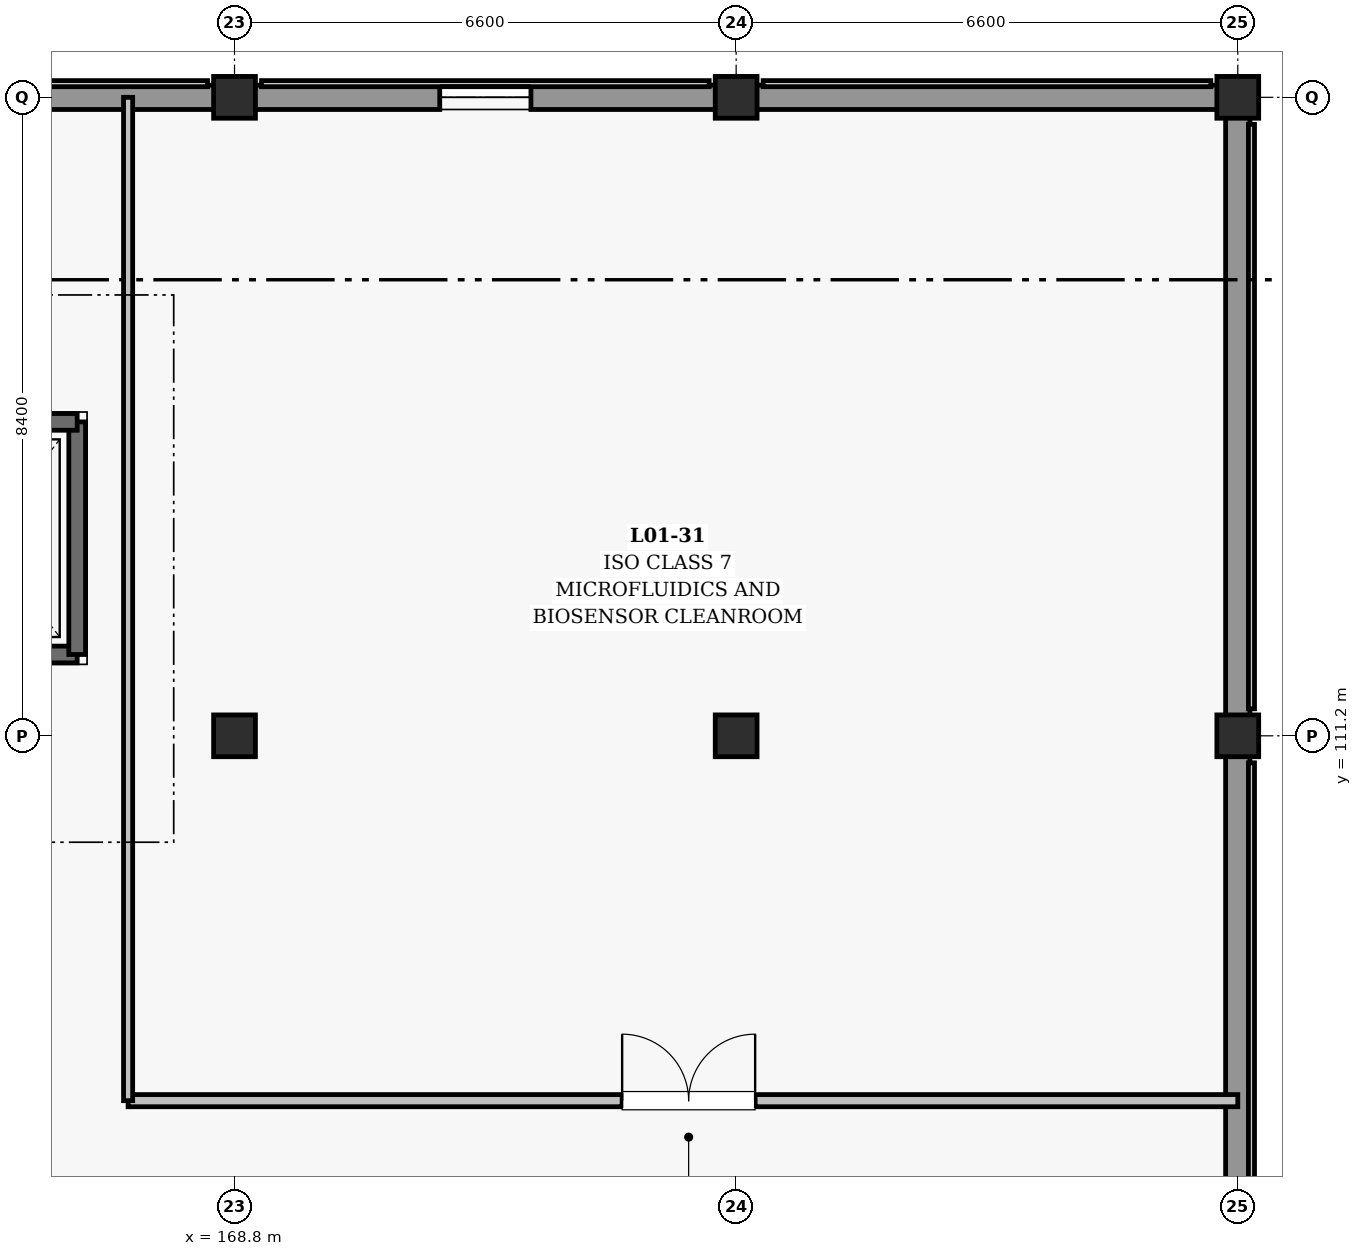
"""IFC4 building model, lengths in metres.
Left out: names, types, materials, properties, quantities, classifications, styles, units other than length and angle.
Written with IfcOpenShell. Run it as: python <this file> out.ifc"""

import sys

from ifc_helpers import new_model, si_unit, direction, frame, frame_2d, origin, origin_2d, place, context, subcontext, project, spatial, rectangle, extrude, element, fill, save


model = new_model("IFC4")
c1 = context("Model", 3, precision=1e-05, world=origin(), true_north=direction((0.0, 1.0)))
c2 = subcontext(c1, "Body", "Model", "MODEL_VIEW")
j1 = project(units=[si_unit("LENGTHUNIT", "METRE"), si_unit("PLANEANGLEUNIT", "RADIAN")], contexts=[c1])
p1 = place(None, origin())
s1 = spatial("IfcSite", under=j1, at=p1, CompositionType="ELEMENT")
p2 = place(p1, origin())
s2 = spatial("IfcBuilding", under=s1, at=p2, CompositionType="ELEMENT")
p3 = place(p2, frame((0.0, 0.0, 5.4)))
s3 = spatial("IfcBuildingStorey", under=s2, at=p3, CompositionType="ELEMENT", Elevation=5.4)
for number, where, z_axis, x_axis in (
    (1, (168.8, 111.2, 0.0), (0.0, 0.0, 1.0), (1.0, 0.0, 0.0)),
    (2, (168.8, 119.6, 0.0), (0.0, 0.0, 1.0), (1.0, 0.0, 0.0)),
    (3, (175.4, 111.2, 0.0), (0.0, 0.0, 1.0), (1.0, 0.0, 0.0)),
    (4, (175.4, 119.6, 0.0), (0.0, 0.0, 1.0), (1.0, 0.0, 0.0)),
    (5, (182.0, 111.2, 0.0), (0.0, 0.0, 1.0), (1.0, 0.0, 0.0)),
    (6, (182.0, 119.6, 0.0), (0.0, 0.0, 1.0), (1.0, 0.0, 0.0)),
):
    element("IfcColumn", number, at=place(p3, frame(where, z_axis=z_axis, x_axis=x_axis)), inside=s3, PredefinedType="COLUMN", context=c2, shape_type="SweptSolid", body=[
        extrude(rectangle(XDim=0.55, YDim=0.55, at=origin_2d()), origin(), (0.0, 0.0, 1.0), 4.5),
    ])
p4 = place(p3, frame((162.455, 119.6, 0.0), z_axis=(0.0, 0.0, 1.0), x_axis=(1.0, 0.0, 0.0)))
e7 = element("IfcWall", 7, at=p4, inside=s3, PredefinedType="SOLIDWALL", context=c2, shape_type="SweptSolid", body=[
    extrude(rectangle(XDim=6.09, YDim=0.32, at=frame_2d((3.045, 0.0))), origin(), (0.0, 0.0, 1.0), 3.305),
])
p5 = place(p3, frame((169.055, 119.6, 0.0), z_axis=(0.0, 0.0, 1.0), x_axis=(1.0, 0.0, 0.0)))
e8 = element("IfcWall", 8, at=p5, inside=s3, PredefinedType="SOLIDWALL", context=c2, shape_type="SweptSolid", body=[
    extrude(rectangle(XDim=6.09, YDim=0.32, at=frame_2d((3.045, 0.0))), origin(), (0.0, 0.0, 1.0), 3.355),
])
p6 = place(p5, frame((2.445, 0.0, 1.85)))
e9 = element("IfcOpeningElement", 9, at=p6, cuts=e8, PredefinedType="OPENING", context=c2, shape_type="SweptSolid", body=[
    extrude(rectangle(XDim=1.2, YDim=1.1, at=frame_2d((0.6, 0.55))), frame((0.0, 0.17, 0.0), z_axis=(0.0, -1.0, 0.0), x_axis=(1.0, 0.0, 0.0)), (0.0, 0.0, 1.0), 0.34),
])
p7 = place(p3, frame((175.655, 119.6, 0.0), z_axis=(0.0, 0.0, 1.0), x_axis=(1.0, 0.0, 0.0)))
e10 = element("IfcWall", 10, at=p7, inside=s3, PredefinedType="SOLIDWALL", context=c2, shape_type="SweptSolid", body=[
    extrude(rectangle(XDim=6.09, YDim=0.32, at=frame_2d((3.045, 0.0))), origin(), (0.0, 0.0, 1.0), 3.58),
])
p8 = place(p3, frame((182.0, 103.055, 0.0), z_axis=(0.0, 0.0, 1.0), x_axis=(0.0, 1.0, 0.0)))
e11 = element("IfcWall", 11, at=p8, inside=s3, PredefinedType="SOLIDWALL", context=c2, shape_type="SweptSolid", body=[
    extrude(rectangle(XDim=7.89, YDim=0.32, at=frame_2d((3.945, 0.0))), origin(), (0.0, 0.0, 1.0), 3.455),
])
p9 = place(p3, frame((182.0, 111.455, 0.0), z_axis=(0.0, 0.0, 1.0), x_axis=(0.0, 1.0, 0.0)))
e12 = element("IfcWall", 12, at=p9, inside=s3, PredefinedType="SOLIDWALL", context=c2, shape_type="SweptSolid", body=[
    extrude(rectangle(XDim=7.89, YDim=0.32, at=frame_2d((3.945, 0.0))), origin(), (0.0, 0.0, 1.0), 3.58),
])
p10 = place(p3, frame((164.27, 112.27, 0.0), z_axis=(0.0, 0.0, 1.0), x_axis=(1.0, 0.0, 0.0)))
e13 = element("IfcWall", 13, at=p10, inside=s3, PredefinedType="SHEAR", context=c2, shape_type="SweptSolid", body=[
    extrude(rectangle(XDim=2.46, YDim=0.22, at=frame_2d((1.23, 0.0))), origin(), (0.0, 0.0, 1.0), 4.235),
])
p11 = place(p10, frame((0.58, 0.0, 0.0)))
e14 = element("IfcOpeningElement", 14, at=p11, cuts=e13, PredefinedType="OPENING", context=c2, shape_type="SweptSolid", body=[
    extrude(rectangle(XDim=1.3, YDim=2.2, at=frame_2d((0.65, 1.1))), frame((0.0, 0.12, 0.0), z_axis=(0.0, -1.0, 0.0), x_axis=(1.0, 0.0, 0.0)), (0.0, 0.0, 1.0), 0.24),
])
p12 = place(p3, frame((166.73, 112.27, 0.0), z_axis=(0.0, 0.0, 1.0), x_axis=(0.0, 1.0, 0.0)))
e15 = element("IfcWall", 15, at=p12, inside=s3, PredefinedType="SHEAR", context=c2, shape_type="SweptSolid", body=[
    extrude(rectangle(XDim=3.06, YDim=0.22, at=frame_2d((1.53, 0.0))), origin(), (0.0, 0.0, 1.0), 4.235),
])
p13 = place(p3, frame((166.73, 115.33, 0.0), z_axis=(0.0, 0.0, 1.0), x_axis=(-1.0, 0.0, 0.0)))
e16 = element("IfcWall", 16, at=p13, inside=s3, PredefinedType="SHEAR", context=c2, shape_type="SweptSolid", body=[
    extrude(rectangle(XDim=2.46, YDim=0.22, at=frame_2d((1.23, 0.0))), origin(), (0.0, 0.0, 1.0), 4.235),
])
p14 = place(p3, frame((167.4, 106.4, 0.0), z_axis=(0.0, 0.0, 1.0), x_axis=(1.0, 0.0, 0.0)))
e17 = element("IfcWall", 17, at=p14, inside=s3, PredefinedType="PARTITIONING", context=c2, shape_type="SweptSolid", body=[
    extrude(rectangle(XDim=14.6, YDim=0.16, at=frame_2d((7.3, 0.0))), origin(), (0.0, 0.0, 1.0), 2.96),
])
p15 = place(p14, frame((6.5, 0.0, 0.0)))
e18 = element("IfcOpeningElement", 18, at=p15, cuts=e17, PredefinedType="OPENING", context=c2, shape_type="SweptSolid", body=[
    extrude(rectangle(XDim=1.75, YDim=2.25, at=frame_2d((0.875, 1.125))), frame((0.0, 0.09, 0.0), z_axis=(0.0, -1.0, 0.0), x_axis=(1.0, 0.0, 0.0)), (0.0, 0.0, 1.0), 0.18),
])
p16 = place(p3, frame((167.4, 106.4, 0.0), z_axis=(0.0, 0.0, 1.0), x_axis=(0.0, 1.0, 0.0)))
e19 = element("IfcWall", 19, at=p16, inside=s3, PredefinedType="PARTITIONING", context=c2, shape_type="SweptSolid", body=[
    extrude(rectangle(XDim=13.2, YDim=0.12, at=frame_2d((6.6, 0.0))), origin(), (0.0, 0.0, 1.0), 3.56),
])
p17 = place(p6, origin())
e20 = element("IfcWindow", 20, at=p17, inside=s3, PartitioningType="SINGLE_PANEL", PredefinedType="WINDOW", context=c2, shape_type="SweptSolid", body=[
    extrude(rectangle(XDim=1.2, YDim=1.1, at=frame_2d((0.6, 0.55))), frame((0.0, 0.03, 0.0), z_axis=(0.0, -1.0, 0.0), x_axis=(1.0, 0.0, 0.0)), (0.0, 0.0, 1.0), 0.06),
])
fill(e9, e20)
p18 = place(p15, origin())
e21 = element("IfcDoor", 21, at=p18, inside=s3, OperationType="DOUBLE_DOOR_SINGLE_SWING", PredefinedType="DOOR", context=c2, shape_type="SweptSolid", body=[
    extrude(rectangle(XDim=1.75, YDim=2.25, at=frame_2d((0.875, 1.125))), frame((0.0, 0.025, 0.0), z_axis=(0.0, -1.0, 0.0), x_axis=(1.0, 0.0, 0.0)), (0.0, 0.0, 1.0), 0.05),
])
fill(e18, e21)
save(model, sys.argv[1])
